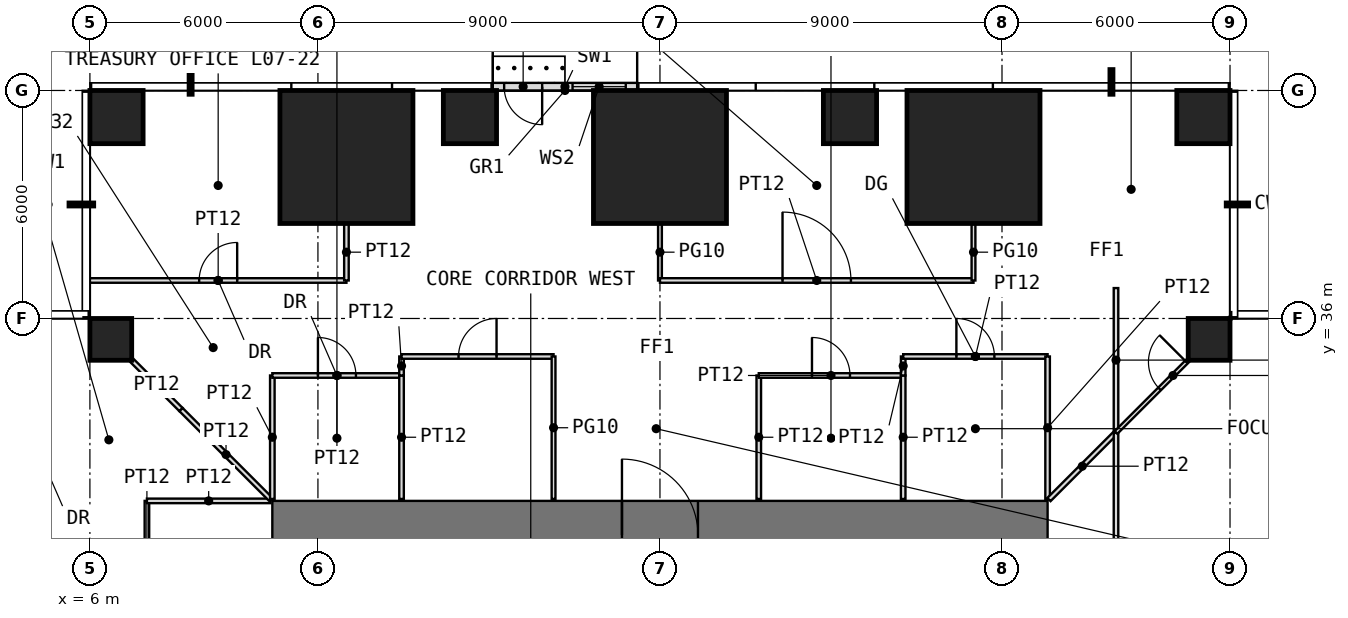
"""IFC4 building model, lengths in metres.
Left out: names, types, materials, properties, quantities, classifications, styles, units other than length and angle.
Written with IfcOpenShell. Run it as: python <this file> out.ifc"""

import sys

from ifc_helpers import new_model, si_unit, direction, frame, frame_2d, origin, origin_2d, place, context, subcontext, project, spatial, rectangle, extrude, element, fill, save


model = new_model("IFC4")
c1 = context("Model", 3, precision=1e-05, world=origin(), true_north=direction((0.0, 1.0)))
c2 = subcontext(c1, "Body", "Model", "MODEL_VIEW")
j1 = project(units=[si_unit("LENGTHUNIT", "METRE"), si_unit("PLANEANGLEUNIT", "RADIAN")], contexts=[c1])
p1 = place(None, origin())
s1 = spatial("IfcSite", under=j1, at=p1, CompositionType="ELEMENT")
p2 = place(p1, origin())
s2 = spatial("IfcBuilding", under=s1, at=p2, CompositionType="ELEMENT")
p3 = place(p2, frame((0.0, 0.0, 34.5)))
s3 = spatial("IfcBuildingStorey", under=s2, at=p3, CompositionType="ELEMENT", Elevation=34.5)
for number, where, z_axis, x_axis in (
    (1, (6.55, 35.45, 0.0), (0.0, 0.0, 1.0), (1.0, 0.0, 0.0)),
    (2, (35.45, 35.45, 0.0), (0.0, 0.0, 1.0), (1.0, 0.0, 0.0)),
):
    element("IfcColumn", number, at=place(p3, frame(where, z_axis=z_axis, x_axis=x_axis)), inside=s3, PredefinedType="COLUMN", context=c2, shape_type="SweptSolid", body=[
        extrude(rectangle(XDim=1.1, YDim=1.1, at=origin_2d()), origin(), (0.0, 0.0, 1.0), 4.0),
    ])
p4 = place(p3, frame((6.7, 41.3, 0.0), z_axis=(0.0, 0.0, 1.0), x_axis=(1.0, 0.0, 0.0)))
e3 = element("IfcColumn", 3, at=p4, inside=s3, PredefinedType="COLUMN", context=c2, shape_type="SweptSolid", body=[
    extrude(rectangle(XDim=1.4, YDim=1.4, at=origin_2d()), origin(), (0.0, 0.0, 1.0), 4.0),
])
p5 = place(p3, frame((12.75, 40.25, 0.0), z_axis=(0.0, 0.0, 1.0), x_axis=(1.0, 0.0, 0.0)))
e4 = element("IfcColumn", 4, at=p5, inside=s3, PredefinedType="COLUMN", context=c2, shape_type="SweptSolid", body=[
    extrude(rectangle(XDim=3.5, YDim=3.5, at=origin_2d()), origin(), (0.0, 0.0, 1.0), 4.0),
])
p6 = place(p3, frame((16.0, 41.3, 0.0), z_axis=(0.0, 0.0, 1.0), x_axis=(1.0, 0.0, 0.0)))
e5 = element("IfcColumn", 5, at=p6, inside=s3, PredefinedType="COLUMN", context=c2, shape_type="SweptSolid", body=[
    extrude(rectangle(XDim=1.4, YDim=1.4, at=origin_2d()), origin(), (0.0, 0.0, 1.0), 4.0),
])
p7 = place(p3, frame((21.0, 40.25, 0.0), z_axis=(0.0, 0.0, 1.0), x_axis=(1.0, 0.0, 0.0)))
e6 = element("IfcColumn", 6, at=p7, inside=s3, PredefinedType="COLUMN", context=c2, shape_type="SweptSolid", body=[
    extrude(rectangle(XDim=3.5, YDim=3.5, at=origin_2d()), origin(), (0.0, 0.0, 1.0), 4.0),
])
p8 = place(p3, frame((26.0, 41.3, 0.0), z_axis=(0.0, 0.0, 1.0), x_axis=(1.0, 0.0, 0.0)))
e7 = element("IfcColumn", 7, at=p8, inside=s3, PredefinedType="COLUMN", context=c2, shape_type="SweptSolid", body=[
    extrude(rectangle(XDim=1.4, YDim=1.4, at=origin_2d()), origin(), (0.0, 0.0, 1.0), 4.0),
])
p9 = place(p3, frame((29.25, 40.25, 0.0), z_axis=(0.0, 0.0, 1.0), x_axis=(1.0, 0.0, 0.0)))
e8 = element("IfcColumn", 8, at=p9, inside=s3, PredefinedType="COLUMN", context=c2, shape_type="SweptSolid", body=[
    extrude(rectangle(XDim=3.5, YDim=3.5, at=origin_2d()), origin(), (0.0, 0.0, 1.0), 4.0),
])
p10 = place(p3, frame((35.3, 41.3, 0.0), z_axis=(0.0, 0.0, 1.0), x_axis=(1.0, 0.0, 0.0)))
e9 = element("IfcColumn", 9, at=p10, inside=s3, PredefinedType="COLUMN", context=c2, shape_type="SweptSolid", body=[
    extrude(rectangle(XDim=1.4, YDim=1.4, at=origin_2d()), origin(), (0.0, 0.0, 1.0), 4.0),
])
p11 = place(p3, frame((20.4, 42.1, 0.0), z_axis=(0.0, 0.0, 1.0), x_axis=(-1.0, 0.0, 0.0)))
e10 = element("IfcWall", 10, at=p11, inside=s3, PredefinedType="USERDEFINED", context=c2, shape_type="SweptSolid", body=[
    extrude(rectangle(XDim=3.8, YDim=0.2, at=frame_2d((1.9, 0.0))), origin(), (0.0, 0.0, 1.0), 3.75),
])
p12 = place(p11, frame((2.5, 0.0, 0.0)))
e11 = element("IfcOpeningElement", 11, at=p12, cuts=e10, PredefinedType="OPENING", context=c2, shape_type="SweptSolid", body=[
    extrude(rectangle(XDim=1.0, YDim=2.4, at=frame_2d((0.5, 1.2))), frame((0.0, 0.11, 0.0), z_axis=(0.0, -1.0, 0.0), x_axis=(1.0, 0.0, 0.0)), (0.0, 0.0, 1.0), 0.22),
])
p13 = place(p11, frame((0.3, 0.0, 0.3)))
e12 = element("IfcOpeningElement", 12, at=p13, cuts=e10, PredefinedType="OPENING", context=c2, shape_type="SweptSolid", body=[
    extrude(rectangle(XDim=1.4, YDim=2.7, at=frame_2d((0.7, 1.35))), frame((0.0, 0.11, 0.0), z_axis=(0.0, -1.0, 0.0), x_axis=(1.0, 0.0, 0.0)), (0.0, 0.0, 1.0), 0.22),
])
p14 = place(p3, frame((10.8, 30.3, -0.05), z_axis=(0.0, 0.0, 1.0), x_axis=(1.0, 0.0, 0.0)))
e13 = element("IfcWall", 13, at=p14, inside=s3, PredefinedType="SHEAR", context=c2, shape_type="SweptSolid", body=[
    extrude(rectangle(XDim=20.4, YDim=1.8, at=frame_2d((10.2, 0.0))), origin(), (0.0, 0.0, 1.0), 4.0),
])
p15 = place(p14, frame((9.2, 0.0, 0.05)))
e14 = element("IfcOpeningElement", 14, at=p15, cuts=e13, PredefinedType="OPENING", context=c2, shape_type="SweptSolid", body=[
    extrude(rectangle(XDim=2.0, YDim=2.2, at=frame_2d((1.0, 1.1))), frame((0.0, 0.91, 0.0), z_axis=(0.0, -1.0, 0.0), x_axis=(1.0, 0.0, 0.0)), (0.0, 0.0, 1.0), 1.82),
])
p16 = place(p3, frame((6.0, 37.0, 0.0), z_axis=(0.0, 0.0, 1.0), x_axis=(1.0, 0.0, 0.0)))
e15 = element("IfcWall", 15, at=p16, inside=s3, PredefinedType="PARTITIONING", context=c2, shape_type="SweptSolid", body=[
    extrude(rectangle(XDim=6.75, YDim=0.12, at=frame_2d((3.375, 0.0))), origin(), (0.0, 0.0, 1.0), 3.75),
])
p17 = place(p16, frame((2.875, 0.0, 0.0)))
e16 = element("IfcOpeningElement", 16, at=p17, cuts=e15, PredefinedType="OPENING", context=c2, shape_type="SweptSolid", body=[
    extrude(rectangle(XDim=1.0, YDim=2.2, at=frame_2d((0.5, 1.1))), frame((0.0, 0.07, 0.0), z_axis=(0.0, -1.0, 0.0), x_axis=(1.0, 0.0, 0.0)), (0.0, 0.0, 1.0), 0.14),
])
p18 = place(p3, frame((7.11, 34.89, 0.0), z_axis=(0.0, 0.0, 1.0), x_axis=(0.707106781187, -0.707106781187, 0.0)))
e17 = element("IfcWall", 17, at=p18, inside=s3, PredefinedType="PARTITIONING", context=c2, shape_type="SweptSolid", body=[
    extrude(rectangle(XDim=1.822, YDim=0.12, at=frame_2d((0.911, 0.0))), origin(), (0.0, 0.0, 1.0), 3.75),
])
p19 = place(p3, frame((7.5, 28.0, 0.0), z_axis=(0.0, 0.0, 1.0), x_axis=(0.0, 1.0, 0.0)))
e18 = element("IfcWall", 18, at=p19, inside=s3, PredefinedType="PARTITIONING", context=c2, shape_type="SweptSolid", body=[
    extrude(rectangle(XDim=3.2, YDim=0.12, at=frame_2d((1.6, 0.0))), origin(), (0.0, 0.0, 1.0), 3.75),
])
p20 = place(p19, frame((1.1, 0.0, 0.0)))
e19 = element("IfcOpeningElement", 19, at=p20, cuts=e18, PredefinedType="OPENING", context=c2, shape_type="SweptSolid", body=[
    extrude(rectangle(XDim=1.0, YDim=2.2, at=frame_2d((0.5, 1.1))), frame((0.0, 0.07, 0.0), z_axis=(0.0, -1.0, 0.0), x_axis=(1.0, 0.0, 0.0)), (0.0, 0.0, 1.0), 0.14),
])
p21 = place(p3, frame((7.5, 31.2, 0.0), z_axis=(0.0, 0.0, 1.0), x_axis=(1.0, 0.0, 0.0)))
e20 = element("IfcWall", 20, at=p21, inside=s3, PredefinedType="PARTITIONING", context=c2, shape_type="SweptSolid", body=[
    extrude(rectangle(XDim=3.25, YDim=0.12, at=frame_2d((1.625, 0.0))), origin(), (0.0, 0.0, 1.0), 3.75),
])
p22 = place(p3, frame((8.398, 33.602, 0.0), z_axis=(0.0, 0.0, 1.0), x_axis=(0.707106781187, -0.707106781187, 0.0)))
e21 = element("IfcWall", 21, at=p22, inside=s3, PredefinedType="PARTITIONING", context=c2, shape_type="SweptSolid", body=[
    extrude(rectangle(XDim=3.346, YDim=0.12, at=frame_2d((1.673, 0.0))), origin(), (0.0, 0.0, 1.0), 3.75),
])
p23 = place(p3, frame((10.8, 31.25, 0.0), z_axis=(0.0, 0.0, 1.0), x_axis=(0.0, 1.0, 0.0)))
e22 = element("IfcWall", 22, at=p23, inside=s3, PredefinedType="PARTITIONING", context=c2, shape_type="SweptSolid", body=[
    extrude(rectangle(XDim=3.25, YDim=0.12, at=frame_2d((1.625, 0.0))), origin(), (0.0, 0.0, 1.0), 3.75),
])
p24 = place(p3, frame((10.8, 34.5, 0.0), z_axis=(0.0, 0.0, 1.0), x_axis=(1.0, 0.0, 0.0)))
e23 = element("IfcWall", 23, at=p24, inside=s3, PredefinedType="PARTITIONING", context=c2, shape_type="SweptSolid", body=[
    extrude(rectangle(XDim=3.4, YDim=0.12, at=frame_2d((1.7, 0.0))), origin(), (0.0, 0.0, 1.0), 3.75),
])
p25 = place(p24, frame((1.2, 0.0, 0.0)))
e24 = element("IfcOpeningElement", 24, at=p25, cuts=e23, PredefinedType="OPENING", context=c2, shape_type="SweptSolid", body=[
    extrude(rectangle(XDim=1.0, YDim=2.2, at=frame_2d((0.5, 1.1))), frame((0.0, 0.07, 0.0), z_axis=(0.0, -1.0, 0.0), x_axis=(1.0, 0.0, 0.0)), (0.0, 0.0, 1.0), 0.14),
])
p26 = place(p3, frame((12.75, 37.0, 0.0), z_axis=(0.0, 0.0, 1.0), x_axis=(0.0, 1.0, 0.0)))
e25 = element("IfcWall", 25, at=p26, inside=s3, PredefinedType="PARTITIONING", context=c2, shape_type="SweptSolid", body=[
    extrude(rectangle(XDim=1.49, YDim=0.12, at=frame_2d((0.745, 0.0))), origin(), (0.0, 0.0, 1.0), 3.75),
])
p27 = place(p3, frame((14.2, 31.25, 0.0), z_axis=(0.0, 0.0, 1.0), x_axis=(0.0, 1.0, 0.0)))
e26 = element("IfcWall", 26, at=p27, inside=s3, PredefinedType="PARTITIONING", context=c2, shape_type="SweptSolid", body=[
    extrude(rectangle(XDim=3.25, YDim=0.12, at=frame_2d((1.625, 0.0))), origin(), (0.0, 0.0, 1.0), 3.75),
])
p28 = place(p3, frame((14.2, 34.5, 0.0), z_axis=(0.0, 0.0, 1.0), x_axis=(0.0, 1.0, 0.0)))
e27 = element("IfcWall", 27, at=p28, inside=s3, PredefinedType="PARTITIONING", context=c2, shape_type="SweptSolid", body=[
    extrude(rectangle(XDim=0.5, YDim=0.12, at=frame_2d((0.25, 0.0))), origin(), (0.0, 0.0, 1.0), 3.75),
])
p29 = place(p3, frame((14.2, 35.0, 0.0), z_axis=(0.0, 0.0, 1.0), x_axis=(1.0, 0.0, 0.0)))
e28 = element("IfcWall", 28, at=p29, inside=s3, PredefinedType="PARTITIONING", context=c2, shape_type="SweptSolid", body=[
    extrude(rectangle(XDim=4.0, YDim=0.12, at=frame_2d((2.0, 0.0))), origin(), (0.0, 0.0, 1.0), 3.75),
])
p30 = place(p29, frame((1.5, 0.0, 0.0)))
e29 = element("IfcOpeningElement", 29, at=p30, cuts=e28, PredefinedType="OPENING", context=c2, shape_type="SweptSolid", body=[
    extrude(rectangle(XDim=1.0, YDim=2.4, at=frame_2d((0.5, 1.2))), frame((0.0, 0.07, 0.0), z_axis=(0.0, -1.0, 0.0), x_axis=(1.0, 0.0, 0.0)), (0.0, 0.0, 1.0), 0.14),
])
p31 = place(p3, frame((18.2, 31.25, 0.0), z_axis=(0.0, 0.0, 1.0), x_axis=(0.0, 1.0, 0.0)))
e30 = element("IfcWall", 30, at=p31, inside=s3, PredefinedType="PARTITIONING", context=c2, shape_type="SweptSolid", body=[
    extrude(rectangle(XDim=3.75, YDim=0.1, at=frame_2d((1.875, 0.0))), origin(), (0.0, 0.0, 1.0), 3.75),
])
p32 = place(p3, frame((21.0, 37.0, 0.0), z_axis=(0.0, 0.0, 1.0), x_axis=(0.0, 1.0, 0.0)))
e31 = element("IfcWall", 31, at=p32, inside=s3, PredefinedType="PARTITIONING", context=c2, shape_type="SweptSolid", body=[
    extrude(rectangle(XDim=1.49, YDim=0.1, at=frame_2d((0.745, 0.0))), origin(), (0.0, 0.0, 1.0), 3.75),
])
p33 = place(p3, frame((21.0, 37.0, 0.0), z_axis=(0.0, 0.0, 1.0), x_axis=(1.0, 0.0, 0.0)))
e32 = element("IfcWall", 32, at=p33, inside=s3, PredefinedType="PARTITIONING", context=c2, shape_type="SweptSolid", body=[
    extrude(rectangle(XDim=8.25, YDim=0.12, at=frame_2d((4.125, 0.0))), origin(), (0.0, 0.0, 1.0), 3.75),
])
p34 = place(p33, frame((3.225, 0.0, 0.0)))
e33 = element("IfcOpeningElement", 33, at=p34, cuts=e32, PredefinedType="OPENING", context=c2, shape_type="SweptSolid", body=[
    extrude(rectangle(XDim=1.8, YDim=2.4, at=frame_2d((0.9, 1.2))), frame((0.0, 0.07, 0.0), z_axis=(0.0, -1.0, 0.0), x_axis=(1.0, 0.0, 0.0)), (0.0, 0.0, 1.0), 0.14),
])
p35 = place(p3, frame((23.6, 31.25, 0.0), z_axis=(0.0, 0.0, 1.0), x_axis=(0.0, 1.0, 0.0)))
e34 = element("IfcWall", 34, at=p35, inside=s3, PredefinedType="PARTITIONING", context=c2, shape_type="SweptSolid", body=[
    extrude(rectangle(XDim=3.25, YDim=0.12, at=frame_2d((1.625, 0.0))), origin(), (0.0, 0.0, 1.0), 3.75),
])
p36 = place(p3, frame((23.6, 34.5, 0.0), z_axis=(0.0, 0.0, 1.0), x_axis=(1.0, 0.0, 0.0)))
e35 = element("IfcWall", 35, at=p36, inside=s3, PredefinedType="PARTITIONING", context=c2, shape_type="SweptSolid", body=[
    extrude(rectangle(XDim=3.8, YDim=0.12, at=frame_2d((1.9, 0.0))), origin(), (0.0, 0.0, 1.0), 3.75),
])
p37 = place(p36, frame((1.4, 0.0, 0.0)))
e36 = element("IfcOpeningElement", 36, at=p37, cuts=e35, PredefinedType="OPENING", context=c2, shape_type="SweptSolid", body=[
    extrude(rectangle(XDim=1.0, YDim=2.2, at=frame_2d((0.5, 1.1))), frame((0.0, 0.07, 0.0), z_axis=(0.0, -1.0, 0.0), x_axis=(1.0, 0.0, 0.0)), (0.0, 0.0, 1.0), 0.14),
])
p38 = place(p3, frame((27.4, 31.25, 0.0), z_axis=(0.0, 0.0, 1.0), x_axis=(0.0, 1.0, 0.0)))
e37 = element("IfcWall", 37, at=p38, inside=s3, PredefinedType="PARTITIONING", context=c2, shape_type="SweptSolid", body=[
    extrude(rectangle(XDim=3.25, YDim=0.12, at=frame_2d((1.625, 0.0))), origin(), (0.0, 0.0, 1.0), 3.75),
])
p39 = place(p3, frame((27.4, 34.5, 0.0), z_axis=(0.0, 0.0, 1.0), x_axis=(0.0, 1.0, 0.0)))
e38 = element("IfcWall", 38, at=p39, inside=s3, PredefinedType="PARTITIONING", context=c2, shape_type="SweptSolid", body=[
    extrude(rectangle(XDim=0.5, YDim=0.12, at=frame_2d((0.25, 0.0))), origin(), (0.0, 0.0, 1.0), 3.75),
])
p40 = place(p3, frame((27.4, 35.0, 0.0), z_axis=(0.0, 0.0, 1.0), x_axis=(1.0, 0.0, 0.0)))
e39 = element("IfcWall", 39, at=p40, inside=s3, PredefinedType="PARTITIONING", context=c2, shape_type="SweptSolid", body=[
    extrude(rectangle(XDim=3.8, YDim=0.12, at=frame_2d((1.9, 0.0))), origin(), (0.0, 0.0, 1.0), 3.75),
])
p41 = place(p40, frame((1.4, 0.0, 0.0)))
e40 = element("IfcOpeningElement", 40, at=p41, cuts=e39, PredefinedType="OPENING", context=c2, shape_type="SweptSolid", body=[
    extrude(rectangle(XDim=1.0, YDim=2.4, at=frame_2d((0.5, 1.2))), frame((0.0, 0.07, 0.0), z_axis=(0.0, -1.0, 0.0), x_axis=(1.0, 0.0, 0.0)), (0.0, 0.0, 1.0), 0.14),
])
p42 = place(p3, frame((29.25, 37.0, 0.0), z_axis=(0.0, 0.0, 1.0), x_axis=(0.0, 1.0, 0.0)))
e41 = element("IfcWall", 41, at=p42, inside=s3, PredefinedType="PARTITIONING", context=c2, shape_type="SweptSolid", body=[
    extrude(rectangle(XDim=1.49, YDim=0.1, at=frame_2d((0.745, 0.0))), origin(), (0.0, 0.0, 1.0), 3.75),
])
p43 = place(p3, frame((31.2, 31.25, 0.0), z_axis=(0.0, 0.0, 1.0), x_axis=(0.0, 1.0, 0.0)))
e42 = element("IfcWall", 42, at=p43, inside=s3, PredefinedType="PARTITIONING", context=c2, shape_type="SweptSolid", body=[
    extrude(rectangle(XDim=3.75, YDim=0.12, at=frame_2d((1.875, 0.0))), origin(), (0.0, 0.0, 1.0), 3.75),
])
p44 = place(p3, frame((31.235, 31.235, 0.0), z_axis=(0.0, 0.0, 1.0), x_axis=(0.707106781187, 0.707106781187, 0.0)))
e43 = element("IfcWall", 43, at=p44, inside=s3, PredefinedType="PARTITIONING", context=c2, shape_type="SweptSolid", body=[
    extrude(rectangle(XDim=2.481, YDim=0.12, at=frame_2d((1.241, 0.0))), origin(), (0.0, 0.0, 1.0), 3.75),
])
p45 = place(p3, frame((33.0, 9.01, 0.0), z_axis=(0.0, 0.0, 1.0), x_axis=(0.0, 1.0, 0.0)))
e44 = element("IfcWall", 44, at=p45, inside=s3, PredefinedType="PARTITIONING", context=c2, shape_type="SweptSolid", body=[
    extrude(rectangle(XDim=23.98, YDim=0.12, at=frame_2d((11.99, 0.0))), origin(), (0.0, 0.0, 1.0), 3.75),
])
p46 = place(p45, frame((11.49, 0.0, 0.0)))
e45 = element("IfcOpeningElement", 45, at=p46, cuts=e44, PredefinedType="OPENING", context=c2, shape_type="SweptSolid", body=[
    extrude(rectangle(XDim=1.0, YDim=2.4, at=frame_2d((0.5, 1.2))), frame((0.0, 0.07, 0.0), z_axis=(0.0, -1.0, 0.0), x_axis=(1.0, 0.0, 0.0)), (0.0, 0.0, 1.0), 0.14),
])
p47 = place(p3, frame((33.0, 33.01, 0.0), z_axis=(0.0, 0.0, 1.0), x_axis=(0.0, 1.0, 0.0)))
e46 = element("IfcWall", 46, at=p47, inside=s3, PredefinedType="PARTITIONING", context=c2, shape_type="SweptSolid", body=[
    extrude(rectangle(XDim=3.79, YDim=0.12, at=frame_2d((1.895, 0.0))), origin(), (0.0, 0.0, 1.0), 3.75),
])
p48 = place(p3, frame((33.0, 33.0, 0.0), z_axis=(0.0, 0.0, 1.0), x_axis=(0.707106781187, 0.707106781187, 0.0)))
e47 = element("IfcWall", 47, at=p48, inside=s3, PredefinedType="PARTITIONING", context=c2, shape_type="SweptSolid", body=[
    extrude(rectangle(XDim=4.243, YDim=0.1, at=frame_2d((2.121, 0.0))), origin(), (0.0, 0.0, 1.0), 3.75),
])
p49 = place(p48, frame((1.621, 0.0, 0.0)))
e48 = element("IfcOpeningElement", 48, at=p49, cuts=e47, PredefinedType="OPENING", context=c2, shape_type="SweptSolid", body=[
    extrude(rectangle(XDim=1.0, YDim=2.4, at=frame_2d((0.5, 1.2))), frame((0.0, 0.06, 0.0), z_axis=(0.0, -1.0, 0.0), x_axis=(1.0, 0.0, 0.0)), (0.0, 0.0, 1.0), 0.12),
])
p50 = place(p12, origin())
e49 = element("IfcDoor", 49, at=p50, inside=s3, OperationType="SINGLE_SWING_LEFT", PredefinedType="DOOR", context=c2, shape_type="SweptSolid", body=[
    extrude(rectangle(XDim=1.0, YDim=2.4, at=frame_2d((0.5, 1.2))), frame((0.0, 0.025, 0.0), z_axis=(0.0, -1.0, 0.0), x_axis=(1.0, 0.0, 0.0)), (0.0, 0.0, 1.0), 0.05),
])
fill(e11, e49)
p51 = place(p13, origin())
e50 = element("IfcWindow", 50, at=p51, inside=s3, PartitioningType="SINGLE_PANEL", PredefinedType="WINDOW", context=c2, shape_type="SweptSolid", body=[
    extrude(rectangle(XDim=1.4, YDim=2.7, at=frame_2d((0.7, 1.35))), frame((0.0, 0.03, 0.0), z_axis=(0.0, -1.0, 0.0), x_axis=(1.0, 0.0, 0.0)), (0.0, 0.0, 1.0), 0.06),
])
fill(e12, e50)
p52 = place(p15, origin())
e51 = element("IfcDoor", 51, at=p52, inside=s3, OperationType="DOUBLE_DOOR_SINGLE_SWING", PredefinedType="DOOR", context=c2, shape_type="SweptSolid", body=[
    extrude(rectangle(XDim=2.0, YDim=2.2, at=frame_2d((1.0, 1.1))), frame((0.0, 0.025, 0.0), z_axis=(0.0, -1.0, 0.0), x_axis=(1.0, 0.0, 0.0)), (0.0, 0.0, 1.0), 0.05),
])
fill(e14, e51)
p53 = place(p25, origin())
e52 = element("IfcDoor", 52, at=p53, inside=s3, OperationType="SINGLE_SWING_LEFT", PredefinedType="DOOR", context=c2, shape_type="SweptSolid", body=[
    extrude(rectangle(XDim=1.0, YDim=2.2, at=frame_2d((0.5, 1.1))), frame((0.0, 0.025, 0.0), z_axis=(0.0, -1.0, 0.0), x_axis=(1.0, 0.0, 0.0)), (0.0, 0.0, 1.0), 0.05),
])
fill(e24, e52)
p54 = place(p30, origin())
e53 = element("IfcDoor", 53, at=p54, inside=s3, OperationType="SINGLE_SWING_RIGHT", PredefinedType="DOOR", context=c2, shape_type="SweptSolid", body=[
    extrude(rectangle(XDim=1.0, YDim=2.4, at=frame_2d((0.5, 1.2))), frame((0.0, 0.025, 0.0), z_axis=(0.0, -1.0, 0.0), x_axis=(1.0, 0.0, 0.0)), (0.0, 0.0, 1.0), 0.05),
])
fill(e29, e53)
p55 = place(p37, origin())
e54 = element("IfcDoor", 54, at=p55, inside=s3, OperationType="SINGLE_SWING_LEFT", PredefinedType="DOOR", context=c2, shape_type="SweptSolid", body=[
    extrude(rectangle(XDim=1.0, YDim=2.2, at=frame_2d((0.5, 1.1))), frame((0.0, 0.025, 0.0), z_axis=(0.0, -1.0, 0.0), x_axis=(1.0, 0.0, 0.0)), (0.0, 0.0, 1.0), 0.05),
])
fill(e36, e54)
p56 = place(p41, origin())
e55 = element("IfcDoor", 55, at=p56, inside=s3, OperationType="SINGLE_SWING_LEFT", PredefinedType="DOOR", context=c2, shape_type="SweptSolid", body=[
    extrude(rectangle(XDim=1.0, YDim=2.4, at=frame_2d((0.5, 1.2))), frame((0.0, 0.025, 0.0), z_axis=(0.0, -1.0, 0.0), x_axis=(1.0, 0.0, 0.0)), (0.0, 0.0, 1.0), 0.05),
])
fill(e40, e55)
p57 = place(p17, origin())
e56 = element("IfcDoor", 56, at=p57, inside=s3, OperationType="SINGLE_SWING_RIGHT", PredefinedType="DOOR", context=c2, shape_type="SweptSolid", body=[
    extrude(rectangle(XDim=1.0, YDim=2.2, at=frame_2d((0.5, 1.1))), frame((0.0, 0.025, 0.0), z_axis=(0.0, -1.0, 0.0), x_axis=(1.0, 0.0, 0.0)), (0.0, 0.0, 1.0), 0.05),
])
fill(e16, e56)
p58 = place(p34, origin())
e57 = element("IfcDoor", 57, at=p58, inside=s3, OperationType="DOUBLE_DOOR_SINGLE_SWING", PredefinedType="DOOR", context=c2, shape_type="SweptSolid", body=[
    extrude(rectangle(XDim=1.8, YDim=2.4, at=frame_2d((0.9, 1.2))), frame((0.0, 0.025, 0.0), z_axis=(0.0, -1.0, 0.0), x_axis=(1.0, 0.0, 0.0)), (0.0, 0.0, 1.0), 0.05),
])
fill(e33, e57)
p59 = place(p49, origin())
e58 = element("IfcDoor", 58, at=p59, inside=s3, OperationType="SINGLE_SWING_RIGHT", PredefinedType="DOOR", context=c2, shape_type="SweptSolid", body=[
    extrude(rectangle(XDim=1.0, YDim=2.4, at=frame_2d((0.5, 1.2))), frame((0.0, 0.025, 0.0), z_axis=(0.0, -1.0, 0.0), x_axis=(1.0, 0.0, 0.0)), (0.0, 0.0, 1.0), 0.05),
])
fill(e48, e58)
save(model, sys.argv[1])
